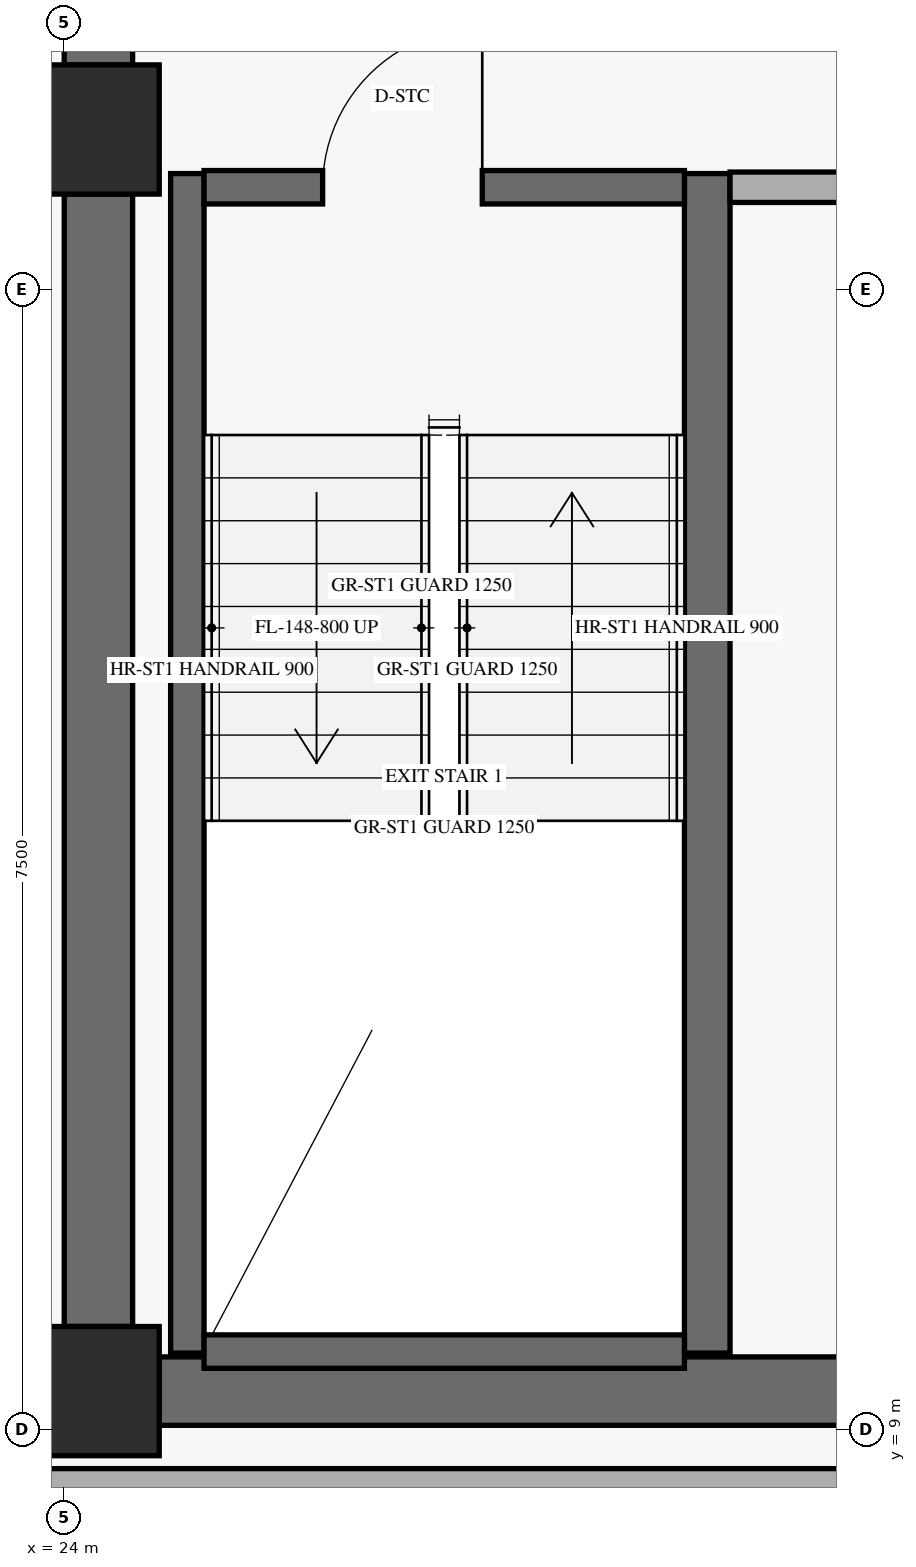
"""IFC4 building model, lengths in metres.
Left out: names, types, materials, properties, quantities, classifications, styles, units other than length and angle.
Written with IfcOpenShell. Run it as: python <this file> out.ifc"""

import sys

from ifc_helpers import new_model, si_unit, direction, frame, frame_2d, origin, origin_2d, place, context, subcontext, project, spatial, rectangle, extrude, element, fill, save


model = new_model("IFC4")
c1 = context("Model", 3, precision=1e-05, world=origin(), true_north=direction((0.0, 1.0)))
c2 = subcontext(c1, "Body", "Model", "MODEL_VIEW")
j1 = project(units=[si_unit("LENGTHUNIT", "METRE"), si_unit("PLANEANGLEUNIT", "RADIAN")], contexts=[c1])
p1 = place(None, origin())
s1 = spatial("IfcSite", under=j1, at=p1, CompositionType="ELEMENT")
p2 = place(p1, origin())
s2 = spatial("IfcBuilding", under=s1, at=p2, CompositionType="ELEMENT")
p3 = place(p2, frame((0.0, 0.0, 27.6)))
s3 = spatial("IfcBuildingStorey", under=s2, at=p3, CompositionType="ELEMENT", Elevation=27.6)
p4 = place(p3, frame((24.225, 9.675, 0.0), z_axis=(0.0, 0.0, 1.0), x_axis=(0.0, 1.0, 0.0)))
e1 = element("IfcWall", 1, at=p4, inside=s3, PredefinedType="SHEAR", context=c2, shape_type="SweptSolid", body=[
    extrude(rectangle(XDim=7.45, YDim=0.45, at=frame_2d((3.725, 0.0))), origin(), (0.0, 0.0, 1.0), 2.667),
])
p5 = place(p3, frame((24.225, 17.975, 0.0), z_axis=(0.0, 0.0, 1.0), x_axis=(0.0, 1.0, 0.0)))
e2 = element("IfcWall", 2, at=p5, inside=s3, PredefinedType="SHEAR", context=c2, shape_type="SweptSolid", body=[
    extrude(rectangle(XDim=11.8, YDim=0.45, at=frame_2d((5.9, 0.0))), origin(), (0.0, 0.0, 1.0), 2.667),
])
p6 = place(p3, frame((24.625, 9.25, 0.0), z_axis=(0.0, 0.0, 1.0), x_axis=(1.0, 0.0, 0.0)))
e3 = element("IfcWall", 3, at=p6, inside=s3, PredefinedType="SHEAR", context=c2, shape_type="SweptSolid", body=[
    extrude(rectangle(XDim=10.15, YDim=0.45, at=frame_2d((5.075, 0.0))), origin(), (0.0, 0.0, 1.0), 3.36),
])
p7 = place(p3, frame((24.81, 9.5, 0.0), z_axis=(0.0, 0.0, 1.0), x_axis=(0.0, 1.0, 0.0)))
e4 = element("IfcWall", 4, at=p7, inside=s3, PredefinedType="SHEAR", context=c2, shape_type="SweptSolid", body=[
    extrude(rectangle(XDim=7.76, YDim=0.22, at=frame_2d((3.88, 0.0))), origin(), (0.0, 0.0, 1.0), 3.36),
])
p8 = place(p3, frame((28.23, 9.5, 0.0), z_axis=(0.0, 0.0, 1.0), x_axis=(0.0, 1.0, 0.0)))
e5 = element("IfcWall", 5, at=p8, inside=s3, PredefinedType="SHEAR", context=c2, shape_type="SweptSolid", body=[
    extrude(rectangle(XDim=7.76, YDim=0.3, at=frame_2d((3.88, 0.0))), origin(), (0.0, 0.0, 1.0), 3.36),
])
p9 = place(p3, frame((24.92, 9.51, 0.0), z_axis=(0.0, 0.0, 1.0), x_axis=(1.0, 0.0, 0.0)))
e6 = element("IfcWall", 6, at=p9, inside=s3, PredefinedType="SHEAR", context=c2, shape_type="SweptSolid", body=[
    extrude(rectangle(XDim=3.16, YDim=0.22, at=frame_2d((1.58, 0.0))), origin(), (0.0, 0.0, 1.0), 3.36),
])
p10 = place(p3, frame((24.92, 17.17, 0.0), z_axis=(0.0, 0.0, 1.0), x_axis=(1.0, 0.0, 0.0)))
e7 = element("IfcWall", 7, at=p10, inside=s3, PredefinedType="SHEAR", context=c2, shape_type="SweptSolid", body=[
    extrude(rectangle(XDim=3.16, YDim=0.22, at=frame_2d((1.58, 0.0))), origin(), (0.0, 0.0, 1.0), 3.36),
])
p11 = place(p10, frame((0.78, 0.0, 0.0)))
e8 = element("IfcOpeningElement", 8, at=p11, cuts=e7, PredefinedType="OPENING", context=c2, shape_type="SweptSolid", body=[
    extrude(rectangle(XDim=1.05, YDim=2.15, at=frame_2d((0.525, 1.075))), frame((0.0, 0.12, 0.0), z_axis=(0.0, -1.0, 0.0), x_axis=(1.0, 0.0, 0.0)), (0.0, 0.0, 1.0), 0.24),
])
for number, where, z_axis, x_axis in (
    (9, (24.2, 9.25, 0.0), (0.0, 0.0, 1.0), (1.0, 0.0, 0.0)),
    (10, (24.2, 17.55, 0.0), (0.0, 0.0, 1.0), (1.0, 0.0, 0.0)),
):
    element("IfcColumn", number, at=place(p3, frame(where, z_axis=z_axis, x_axis=x_axis)), inside=s3, PredefinedType="COLUMN", context=c2, shape_type="SweptSolid", body=[
        extrude(rectangle(XDim=0.85, YDim=0.85, at=origin_2d()), origin(), (0.0, 0.0, 1.0), 3.6),
    ])
p12 = place(p3, frame((28.38, 17.17, 0.0), z_axis=(0.0, 0.0, 1.0), x_axis=(1.0, 0.0, 0.0)))
e11 = element("IfcWall", 11, at=p12, inside=s3, PredefinedType="STANDARD", context=c2, shape_type="SweptSolid", body=[
    extrude(rectangle(XDim=2.9, YDim=0.2, at=frame_2d((1.45, 0.0))), origin(), (0.0, 0.0, 1.0), 3.36),
])
p13 = place(p3, frame((23.75, 8.65, 0.0), z_axis=(0.0, 0.0, 1.0), x_axis=(1.0, 0.0, 0.0)))
e12 = element("IfcWall", 12, at=p13, inside=s3, PredefinedType="STANDARD", context=c2, shape_type="SweptSolid", body=[
    extrude(rectangle(XDim=11.67, YDim=0.18, at=frame_2d((5.835, 0.0))), origin(), (0.0, 0.0, 1.0), 2.649),
])
p14 = place(p11, frame((1.05, 0.0, 0.0), z_axis=(0.0, 0.0, 1.0), x_axis=(-1.0, 0.0, 0.0)))
e13 = element("IfcDoor", 13, at=p14, inside=s3, OperationType="SINGLE_SWING_LEFT", PredefinedType="DOOR", context=c2, shape_type="SweptSolid", body=[
    extrude(rectangle(XDim=1.05, YDim=2.15, at=frame_2d((0.525, 1.075))), frame((0.0, 0.025, 0.0), z_axis=(0.0, -1.0, 0.0), x_axis=(1.0, 0.0, 0.0)), (0.0, 0.0, 1.0), 0.05),
])
fill(e8, e13)
save(model, sys.argv[1])
